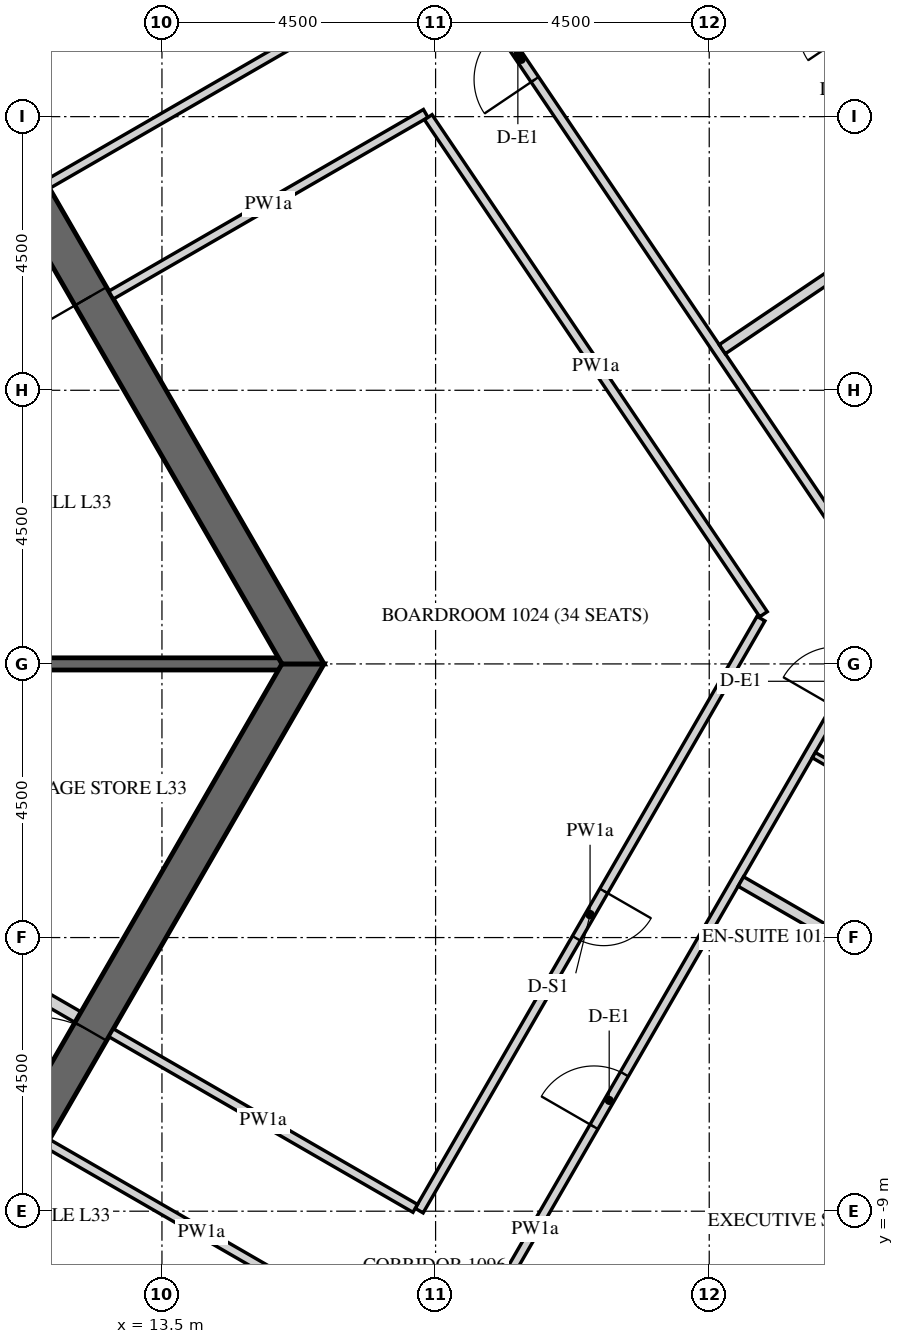
"""IFC4 building model, lengths in metres.
Left out: names, types, materials, properties, quantities, classifications, styles, units other than length and angle.
Written with IfcOpenShell. Run it as: python <this file> out.ifc"""

import sys

from ifc_helpers import new_model, si_unit, direction, frame, frame_2d, origin, place, context, subcontext, project, spatial, polyline, rectangle, outline, extrude, element, fill, save


model = new_model("IFC4")
c1 = context("Model", 3, precision=1e-05, world=origin(), true_north=direction((0.0, 1.0)))
c2 = subcontext(c1, "Body", "Model", "MODEL_VIEW")
j1 = project(units=[si_unit("LENGTHUNIT", "METRE"), si_unit("PLANEANGLEUNIT", "RADIAN")], contexts=[c1])
p1 = place(None, origin())
s1 = spatial("IfcSite", under=j1, at=p1, CompositionType="ELEMENT")
p2 = place(p1, origin())
s2 = spatial("IfcBuilding", under=s1, at=p2, CompositionType="ELEMENT")
p3 = place(p2, frame((0.0, 0.0, 142.8)))
s3 = spatial("IfcBuildingStorey", under=s2, at=p3, CompositionType="ELEMENT", Elevation=142.8)
p4 = place(p3, frame((18.83, -26.835, -0.15), z_axis=(0.0, 0.0, 1.0), x_axis=(0.500003800416, 0.866023209602, 0.0)))
e1 = element("IfcWall", 1, at=p4, inside=s3, PredefinedType="SOLIDWALL", context=c2, shape_type="SweptSolid", body=[
    extrude(outline(polyline([(-0.022, -0.275), (30.097, -0.275), (30.045, 0.275), (0.022, 0.275), (-0.022, -0.275)])), origin(), (0.0, 0.0, 1.0), 3.75),
])
p5 = place(p4, frame((1.236, 0.0, 1.05)))
e2 = element("IfcOpeningElement", 2, at=p5, cuts=e1, PredefinedType="OPENING", context=c2, shape_type="SweptSolid", body=[
    extrude(rectangle(XDim=2.4, YDim=2.4, at=frame_2d((1.2, 1.2))), frame((0.0, 0.285, 0.0), z_axis=(0.0, -1.0, 0.0), x_axis=(1.0, 0.0, 0.0)), (0.0, 0.0, 1.0), 0.57),
])
p6 = place(p4, frame((4.835, 0.0, 1.05)))
e3 = element("IfcOpeningElement", 3, at=p6, cuts=e1, PredefinedType="OPENING", context=c2, shape_type="SweptSolid", body=[
    extrude(rectangle(XDim=2.4, YDim=2.4, at=frame_2d((1.2, 1.2))), frame((0.0, 0.285, 0.0), z_axis=(0.0, -1.0, 0.0), x_axis=(1.0, 0.0, 0.0)), (0.0, 0.0, 1.0), 0.57),
])
p7 = place(p4, frame((8.436, 0.0, 1.05)))
e4 = element("IfcOpeningElement", 4, at=p7, cuts=e1, PredefinedType="OPENING", context=c2, shape_type="SweptSolid", body=[
    extrude(rectangle(XDim=2.4, YDim=2.4, at=frame_2d((1.2, 1.2))), frame((0.0, 0.285, 0.0), z_axis=(0.0, -1.0, 0.0), x_axis=(1.0, 0.0, 0.0)), (0.0, 0.0, 1.0), 0.57),
])
p8 = place(p4, frame((12.035, 0.0, 1.05)))
e5 = element("IfcOpeningElement", 5, at=p8, cuts=e1, PredefinedType="OPENING", context=c2, shape_type="SweptSolid", body=[
    extrude(rectangle(XDim=2.4, YDim=2.4, at=frame_2d((1.2, 1.2))), frame((0.0, 0.285, 0.0), z_axis=(0.0, -1.0, 0.0), x_axis=(1.0, 0.0, 0.0)), (0.0, 0.0, 1.0), 0.57),
])
p9 = place(p4, frame((15.635, 0.0, 1.05)))
e6 = element("IfcOpeningElement", 6, at=p9, cuts=e1, PredefinedType="OPENING", context=c2, shape_type="SweptSolid", body=[
    extrude(rectangle(XDim=2.4, YDim=2.4, at=frame_2d((1.2, 1.2))), frame((0.0, 0.285, 0.0), z_axis=(0.0, -1.0, 0.0), x_axis=(1.0, 0.0, 0.0)), (0.0, 0.0, 1.0), 0.57),
])
p10 = place(p4, frame((19.236, 0.0, 1.05)))
e7 = element("IfcOpeningElement", 7, at=p10, cuts=e1, PredefinedType="OPENING", context=c2, shape_type="SweptSolid", body=[
    extrude(rectangle(XDim=2.4, YDim=2.4, at=frame_2d((1.2, 1.2))), frame((0.0, 0.285, 0.0), z_axis=(0.0, -1.0, 0.0), x_axis=(1.0, 0.0, 0.0)), (0.0, 0.0, 1.0), 0.57),
])
p11 = place(p4, frame((22.835, 0.0, 1.05)))
e8 = element("IfcOpeningElement", 8, at=p11, cuts=e1, PredefinedType="OPENING", context=c2, shape_type="SweptSolid", body=[
    extrude(rectangle(XDim=2.4, YDim=2.4, at=frame_2d((1.2, 1.2))), frame((0.0, 0.285, 0.0), z_axis=(0.0, -1.0, 0.0), x_axis=(1.0, 0.0, 0.0)), (0.0, 0.0, 1.0), 0.57),
])
p12 = place(p4, frame((26.436, 0.0, 1.05)))
e9 = element("IfcOpeningElement", 9, at=p12, cuts=e1, PredefinedType="OPENING", context=c2, shape_type="SweptSolid", body=[
    extrude(rectangle(XDim=2.4, YDim=2.4, at=frame_2d((1.2, 1.2))), frame((0.0, 0.285, 0.0), z_axis=(0.0, -1.0, 0.0), x_axis=(1.0, 0.0, 0.0)), (0.0, 0.0, 1.0), 0.57),
])
p13 = place(p3, frame((33.728, 3.153, -0.15), z_axis=(0.0, 0.0, 1.0), x_axis=(-0.559192411416, 0.82903790445, 0.0)))
e10 = element("IfcWall", 10, at=p13, inside=s3, PredefinedType="SOLIDWALL", context=c2, shape_type="SweptSolid", body=[
    extrude(outline(polyline([(-0.026, -0.275), (30.093, -0.275), (30.048, 0.275), (0.026, 0.275), (-0.026, -0.275)])), origin(), (0.0, 0.0, 1.0), 3.75),
])
p14 = place(p13, frame((1.236, 0.0, 1.05)))
e11 = element("IfcOpeningElement", 11, at=p14, cuts=e10, PredefinedType="OPENING", context=c2, shape_type="SweptSolid", body=[
    extrude(rectangle(XDim=2.4, YDim=2.4, at=frame_2d((1.2, 1.2))), frame((0.0, 0.285, 0.0), z_axis=(0.0, -1.0, 0.0), x_axis=(1.0, 0.0, 0.0)), (0.0, 0.0, 1.0), 0.57),
])
p15 = place(p13, frame((4.835, 0.0, 1.05)))
e12 = element("IfcOpeningElement", 12, at=p15, cuts=e10, PredefinedType="OPENING", context=c2, shape_type="SweptSolid", body=[
    extrude(rectangle(XDim=2.4, YDim=2.4, at=frame_2d((1.2, 1.2))), frame((0.0, 0.285, 0.0), z_axis=(0.0, -1.0, 0.0), x_axis=(1.0, 0.0, 0.0)), (0.0, 0.0, 1.0), 0.57),
])
p16 = place(p13, frame((8.436, 0.0, 1.05)))
e13 = element("IfcOpeningElement", 13, at=p16, cuts=e10, PredefinedType="OPENING", context=c2, shape_type="SweptSolid", body=[
    extrude(rectangle(XDim=2.4, YDim=2.4, at=frame_2d((1.2, 1.2))), frame((0.0, 0.285, 0.0), z_axis=(0.0, -1.0, 0.0), x_axis=(1.0, 0.0, 0.0)), (0.0, 0.0, 1.0), 0.57),
])
p17 = place(p13, frame((12.035, 0.0, 1.05)))
e14 = element("IfcOpeningElement", 14, at=p17, cuts=e10, PredefinedType="OPENING", context=c2, shape_type="SweptSolid", body=[
    extrude(rectangle(XDim=2.4, YDim=2.4, at=frame_2d((1.2, 1.2))), frame((0.0, 0.285, 0.0), z_axis=(0.0, -1.0, 0.0), x_axis=(1.0, 0.0, 0.0)), (0.0, 0.0, 1.0), 0.57),
])
p18 = place(p13, frame((15.635, 0.0, 1.05)))
e15 = element("IfcOpeningElement", 15, at=p18, cuts=e10, PredefinedType="OPENING", context=c2, shape_type="SweptSolid", body=[
    extrude(rectangle(XDim=2.4, YDim=2.4, at=frame_2d((1.2, 1.2))), frame((0.0, 0.285, 0.0), z_axis=(0.0, -1.0, 0.0), x_axis=(1.0, 0.0, 0.0)), (0.0, 0.0, 1.0), 0.57),
])
p19 = place(p13, frame((19.236, 0.0, 1.05)))
e16 = element("IfcOpeningElement", 16, at=p19, cuts=e10, PredefinedType="OPENING", context=c2, shape_type="SweptSolid", body=[
    extrude(rectangle(XDim=2.4, YDim=2.4, at=frame_2d((1.2, 1.2))), frame((0.0, 0.285, 0.0), z_axis=(0.0, -1.0, 0.0), x_axis=(1.0, 0.0, 0.0)), (0.0, 0.0, 1.0), 0.57),
])
p20 = place(p13, frame((22.835, 0.0, 1.05)))
e17 = element("IfcOpeningElement", 17, at=p20, cuts=e10, PredefinedType="OPENING", context=c2, shape_type="SweptSolid", body=[
    extrude(rectangle(XDim=2.4, YDim=2.4, at=frame_2d((1.2, 1.2))), frame((0.0, 0.285, 0.0), z_axis=(0.0, -1.0, 0.0), x_axis=(1.0, 0.0, 0.0)), (0.0, 0.0, 1.0), 0.57),
])
p21 = place(p13, frame((26.436, 0.0, 1.05)))
e18 = element("IfcOpeningElement", 18, at=p21, cuts=e10, PredefinedType="OPENING", context=c2, shape_type="SweptSolid", body=[
    extrude(rectangle(XDim=2.4, YDim=2.4, at=frame_2d((1.2, 1.2))), frame((0.0, 0.285, 0.0), z_axis=(0.0, -1.0, 0.0), x_axis=(1.0, 0.0, 0.0)), (0.0, 0.0, 1.0), 0.57),
])
p22 = place(p3, frame((7.91, -13.7, -0.15), z_axis=(0.0, 0.0, 1.0), x_axis=(0.499999880136, 0.866025472988, 0.0)))
e19 = element("IfcWall", 19, at=p22, inside=s3, PredefinedType="SHEAR", context=c2, shape_type="SweptSolid", body=[
    extrude(outline(polyline([(-0.173, -0.3), (15.993, -0.3), (15.646, 0.3), (0.173, 0.3), (-0.173, -0.3)])), origin(), (0.0, 0.0, 1.0), 3.75),
])
p23 = place(p22, frame((7.039, 0.0, 0.15)))
e20 = element("IfcOpeningElement", 20, at=p23, cuts=e19, PredefinedType="OPENING", context=c2, shape_type="SweptSolid", body=[
    extrude(rectangle(XDim=1.8, YDim=2.4, at=frame_2d((0.9, 1.2))), frame((0.0, 0.31, 0.0), z_axis=(0.0, -1.0, 0.0), x_axis=(1.0, 0.0, 0.0)), (0.0, 0.0, 1.0), 0.62),
])
p24 = place(p3, frame((15.819, 0.0, -0.15), z_axis=(0.0, 0.0, 1.0), x_axis=(-0.499999880136, 0.866025472988, 0.0)))
e21 = element("IfcWall", 21, at=p24, inside=s3, PredefinedType="SHEAR", context=c2, shape_type="SweptSolid", body=[
    extrude(outline(polyline([(-0.173, -0.3), (15.993, -0.3), (15.646, 0.3), (0.173, 0.3), (-0.173, -0.3)])), origin(), (0.0, 0.0, 1.0), 3.75),
])
p25 = place(p24, frame((6.981, 0.0, 0.15)))
e22 = element("IfcOpeningElement", 22, at=p25, cuts=e21, PredefinedType="OPENING", context=c2, shape_type="SweptSolid", body=[
    extrude(rectangle(XDim=1.8, YDim=2.4, at=frame_2d((0.9, 1.2))), frame((0.0, 0.31, 0.0), z_axis=(0.0, -1.0, 0.0), x_axis=(1.0, 0.0, 0.0)), (0.0, 0.0, 1.0), 0.62),
])
p26 = place(p3, frame((11.547, 0.0, -0.15), z_axis=(0.0, 0.0, 1.0), x_axis=(1.0, 0.0, 0.0)))
e23 = element("IfcWall", 23, at=p26, inside=s3, PredefinedType="SHEAR", context=c2, shape_type="SweptSolid", body=[
    extrude(rectangle(XDim=3.926, YDim=0.2, at=frame_2d((1.963, 0.0))), origin(), (0.0, 0.0, 1.0), 3.75),
])
p27 = place(p3, frame((9.175, -4.109, 0.0), z_axis=(0.0, 0.0, 1.0), x_axis=(0.865989465428, -0.500062241894, 0.0)))
e24 = element("IfcWall", 24, at=p27, inside=s3, PredefinedType="PARTITIONING", context=c2, shape_type="SweptSolid", body=[
    extrude(rectangle(XDim=3.4, YDim=0.2, at=frame_2d((1.7, 0.0))), origin(), (0.0, 0.0, 1.0), 3.65),
])
p28 = place(p27, frame((1.351, 0.0, 0.0)))
e25 = element("IfcOpeningElement", 25, at=p28, cuts=e24, PredefinedType="OPENING", context=c2, shape_type="SweptSolid", body=[
    extrude(rectangle(XDim=0.9, YDim=2.1, at=frame_2d((0.45, 1.05))), frame((0.0, 0.11, 0.0), z_axis=(0.0, -1.0, 0.0), x_axis=(1.0, 0.0, 0.0)), (0.0, 0.0, 1.0), 0.22),
])
p29 = place(p3, frame((13.755, -19.475, 0.0), z_axis=(0.0, 0.0, 1.0), x_axis=(0.50000013933, 0.866025323342, 0.0)))
e26 = element("IfcWall", 26, at=p29, inside=s3, PredefinedType="PARTITIONING", context=c2, shape_type="SweptSolid", body=[
    extrude(rectangle(XDim=23.517, YDim=0.15, at=frame_2d((11.758, 0.0))), origin(), (0.0, 0.0, 1.0), 2.838),
])
p30 = place(p29, frame((4.456, 0.0, 0.0)))
e27 = element("IfcOpeningElement", 27, at=p30, cuts=e26, PredefinedType="OPENING", context=c2, shape_type="SweptSolid", body=[
    extrude(rectangle(XDim=1.0, YDim=2.1, at=frame_2d((0.5, 1.05))), frame((0.0, 0.085, 0.0), z_axis=(0.0, -1.0, 0.0), x_axis=(1.0, 0.0, 0.0)), (0.0, 0.0, 1.0), 0.17),
])
p31 = place(p29, frame((13.699, 0.0, 0.0)))
e28 = element("IfcOpeningElement", 28, at=p31, cuts=e26, PredefinedType="OPENING", context=c2, shape_type="SweptSolid", body=[
    extrude(rectangle(XDim=1.0, YDim=2.1, at=frame_2d((0.5, 1.05))), frame((0.0, 0.085, 0.0), z_axis=(0.0, -1.0, 0.0), x_axis=(1.0, 0.0, 0.0)), (0.0, 0.0, 1.0), 0.17),
])
p32 = place(p29, frame((21.658, 0.0, 0.0)))
e29 = element("IfcOpeningElement", 29, at=p32, cuts=e26, PredefinedType="OPENING", context=c2, shape_type="SweptSolid", body=[
    extrude(rectangle(XDim=1.0, YDim=2.1, at=frame_2d((0.5, 1.05))), frame((0.0, 0.085, 0.0), z_axis=(0.0, -1.0, 0.0), x_axis=(1.0, 0.0, 0.0)), (0.0, 0.0, 1.0), 0.17),
])
p33 = place(p3, frame((25.467, 0.96, 0.0), z_axis=(0.0, 0.0, 1.0), x_axis=(-0.559200743185, 0.829032284547, 0.0)))
e30 = element("IfcWall", 30, at=p33, inside=s3, PredefinedType="PARTITIONING", context=c2, shape_type="SweptSolid", body=[
    extrude(rectangle(XDim=21.668, YDim=0.15, at=frame_2d((10.834, 0.0))), origin(), (0.0, 0.0, 1.0), 2.838),
])
p34 = place(p33, frame((10.434, 0.0, 0.0)))
e31 = element("IfcOpeningElement", 31, at=p34, cuts=e30, PredefinedType="OPENING", context=c2, shape_type="SweptSolid", body=[
    extrude(rectangle(XDim=1.0, YDim=2.1, at=frame_2d((0.5, 1.05))), frame((0.0, 0.085, 0.0), z_axis=(0.0, -1.0, 0.0), x_axis=(1.0, 0.0, 0.0)), (0.0, 0.0, 1.0), 0.17),
])
p35 = place(p3, frame((12.664, 6.066, 0.0), z_axis=(0.0, 0.0, 1.0), x_axis=(0.866018848283, 0.500011354289, 0.0)))
e32 = element("IfcWall", 32, at=p35, inside=s3, PredefinedType="PARTITIONING", context=c2, shape_type="SweptSolid", body=[
    extrude(rectangle(XDim=5.974, YDim=0.15, at=frame_2d((2.987, 0.0))), origin(), (0.0, 0.0, 1.0), 2.838),
])
p36 = place(p3, frame((17.879, 8.99, 0.0), z_axis=(0.0, 0.0, 1.0), x_axis=(0.559189565351, -0.829039824136, 0.0)))
e33 = element("IfcWall", 33, at=p36, inside=s3, PredefinedType="PARTITIONING", context=c2, shape_type="SweptSolid", body=[
    extrude(rectangle(XDim=9.859, YDim=0.15, at=frame_2d((4.929, 0.0))), origin(), (0.0, 0.0, 1.0), 2.838),
])
p37 = place(p3, frame((23.351, 0.745, 0.0), z_axis=(0.0, 0.0, 1.0), x_axis=(-0.500009458068, -0.866019943097, 0.0)))
e34 = element("IfcWall", 34, at=p37, inside=s3, PredefinedType="PARTITIONING", context=c2, shape_type="SweptSolid", body=[
    extrude(rectangle(XDim=11.241, YDim=0.15, at=frame_2d((5.621, 0.0))), origin(), (0.0, 0.0, 1.0), 2.838),
])
p38 = place(p37, frame((5.171, 0.0, 0.0)))
e35 = element("IfcOpeningElement", 35, at=p38, cuts=e34, PredefinedType="OPENING", context=c2, shape_type="SweptSolid", body=[
    extrude(rectangle(XDim=0.9, YDim=2.1, at=frame_2d((0.45, 1.05))), frame((0.0, 0.085, 0.0), z_axis=(0.0, -1.0, 0.0), x_axis=(1.0, 0.0, 0.0)), (0.0, 0.0, 1.0), 0.17),
])
p39 = place(p3, frame((17.665, -8.953, 0.0), z_axis=(0.0, 0.0, 1.0), x_axis=(-0.866025774745, 0.499999357477, 0.0)))
e36 = element("IfcWall", 36, at=p39, inside=s3, PredefinedType="PARTITIONING", context=c2, shape_type="SweptSolid", body=[
    extrude(rectangle(XDim=5.775, YDim=0.15, at=frame_2d((2.887, 0.0))), origin(), (0.0, 0.0, 1.0), 2.838),
])
p40 = place(p3, frame((11.614, -7.884, 0.0), z_axis=(0.0, 0.0, 1.0), x_axis=(0.866018092707, -0.500012662943, 0.0)))
e37 = element("IfcWall", 37, at=p40, inside=s3, PredefinedType="PARTITIONING", context=c2, shape_type="SweptSolid", body=[
    extrude(rectangle(XDim=5.85, YDim=0.15, at=frame_2d((2.925, 0.0))), origin(), (0.0, 0.0, 1.0), 2.838),
])
p41 = place(p3, frame((16.595, 10.76, 0.0), z_axis=(0.0, 0.0, 1.0), x_axis=(-0.866019477104, -0.500010265171, 0.0)))
e38 = element("IfcWall", 38, at=p41, inside=s3, PredefinedType="PARTITIONING", context=c2, shape_type="SweptSolid", body=[
    extrude(rectangle(XDim=5.752, YDim=0.15, at=frame_2d((2.876, 0.0))), origin(), (0.0, 0.0, 1.0), 2.838),
])
p42 = place(p3, frame((29.71, -7.441, 0.0), z_axis=(0.0, 0.0, 1.0), x_axis=(-0.866019273868, 0.500010617176, 0.0)))
e39 = element("IfcWall", 39, at=p42, inside=s3, PredefinedType="PARTITIONING", context=c2, shape_type="SweptSolid", body=[
    extrude(rectangle(XDim=7.725, YDim=0.18, at=frame_2d((3.862, 0.0))), origin(), (0.0, 0.0, 1.0), 2.838),
])
p43 = place(p3, frame((24.22, -1.5, 0.0), z_axis=(0.0, 0.0, 1.0), x_axis=(0.866012511928, -0.500022328685, 0.0)))
e40 = element("IfcWall", 40, at=p43, inside=s3, PredefinedType="PARTITIONING", context=c2, shape_type="SweptSolid", body=[
    extrude(rectangle(XDim=2.725, YDim=0.1, at=frame_2d((1.363, 0.0))), origin(), (0.0, 0.0, 1.0), 2.838),
])
p44 = place(p43, frame((0.925, 0.0, 0.0)))
e41 = element("IfcOpeningElement", 41, at=p44, cuts=e40, PredefinedType="OPENING", context=c2, shape_type="SweptSolid", body=[
    extrude(rectangle(XDim=0.8, YDim=2.1, at=frame_2d((0.4, 1.05))), frame((0.0, 0.06, 0.0), z_axis=(0.0, -1.0, 0.0), x_axis=(1.0, 0.0, 0.0)), (0.0, 0.0, 1.0), 0.12),
])
p45 = place(p3, frame((29.119, 9.495, 0.0), z_axis=(0.0, 0.0, 1.0), x_axis=(-0.82903328576, -0.559199258853, 0.0)))
e42 = element("IfcWall", 42, at=p45, inside=s3, PredefinedType="PARTITIONING", context=c2, shape_type="SweptSolid", body=[
    extrude(rectangle(XDim=7.725, YDim=0.18, at=frame_2d((3.863, 0.0))), origin(), (0.0, 0.0, 1.0), 2.838),
])
p46 = place(p3, frame((26.581, 7.892, 0.0), z_axis=(0.0, 0.0, 1.0), x_axis=(-0.559185029686, 0.829042883435, 0.0)))
e43 = element("IfcWall", 43, at=p46, inside=s3, PredefinedType="PARTITIONING", context=c2, shape_type="SweptSolid", body=[
    extrude(rectangle(XDim=7.11, YDim=0.1, at=frame_2d((3.555, 0.0))), origin(), (0.0, 0.0, 1.0), 2.838),
])
p47 = place(p46, frame((3.06, 0.0, 0.0)))
e44 = element("IfcOpeningElement", 44, at=p47, cuts=e43, PredefinedType="OPENING", context=c2, shape_type="SweptSolid", body=[
    extrude(rectangle(XDim=0.9, YDim=2.1, at=frame_2d((0.45, 1.05))), frame((0.0, 0.06, 0.0), z_axis=(0.0, -1.0, 0.0), x_axis=(1.0, 0.0, 0.0)), (0.0, 0.0, 1.0), 0.12),
])
p48 = place(p25, origin())
e45 = element("IfcDoor", 45, at=p48, inside=s3, OperationType="DOUBLE_DOOR_SINGLE_SWING", PredefinedType="DOOR", context=c2, shape_type="SweptSolid", body=[
    extrude(rectangle(XDim=1.8, YDim=2.4, at=frame_2d((0.9, 1.2))), frame((0.0, 0.025, 0.0), z_axis=(0.0, -1.0, 0.0), x_axis=(1.0, 0.0, 0.0)), (0.0, 0.0, 1.0), 0.05),
])
fill(e22, e45)
p49 = place(p23, origin())
e46 = element("IfcDoor", 46, at=p49, inside=s3, OperationType="DOUBLE_DOOR_SINGLE_SWING", PredefinedType="DOOR", context=c2, shape_type="SweptSolid", body=[
    extrude(rectangle(XDim=1.8, YDim=2.4, at=frame_2d((0.9, 1.2))), frame((0.0, 0.025, 0.0), z_axis=(0.0, -1.0, 0.0), x_axis=(1.0, 0.0, 0.0)), (0.0, 0.0, 1.0), 0.05),
])
fill(e20, e46)
p50 = place(p31, origin())
e47 = element("IfcDoor", 47, at=p50, inside=s3, OperationType="SINGLE_SWING_RIGHT", PredefinedType="DOOR", context=c2, shape_type="SweptSolid", body=[
    extrude(rectangle(XDim=1.0, YDim=2.1, at=frame_2d((0.5, 1.05))), frame((0.0, 0.025, 0.0), z_axis=(0.0, -1.0, 0.0), x_axis=(1.0, 0.0, 0.0)), (0.0, 0.0, 1.0), 0.05),
])
fill(e28, e47)
p51 = place(p34, origin())
e48 = element("IfcDoor", 48, at=p51, inside=s3, OperationType="SINGLE_SWING_RIGHT", PredefinedType="DOOR", context=c2, shape_type="SweptSolid", body=[
    extrude(rectangle(XDim=1.0, YDim=2.1, at=frame_2d((0.5, 1.05))), frame((0.0, 0.025, 0.0), z_axis=(0.0, -1.0, 0.0), x_axis=(1.0, 0.0, 0.0)), (0.0, 0.0, 1.0), 0.05),
])
fill(e31, e48)
p52 = place(p38, origin())
e49 = element("IfcDoor", 49, at=p52, inside=s3, OperationType="SINGLE_SWING_LEFT", PredefinedType="DOOR", context=c2, shape_type="SweptSolid", body=[
    extrude(rectangle(XDim=0.9, YDim=2.1, at=frame_2d((0.45, 1.05))), frame((0.0, 0.025, 0.0), z_axis=(0.0, -1.0, 0.0), x_axis=(1.0, 0.0, 0.0)), (0.0, 0.0, 1.0), 0.05),
])
fill(e35, e49)
save(model, sys.argv[1])
